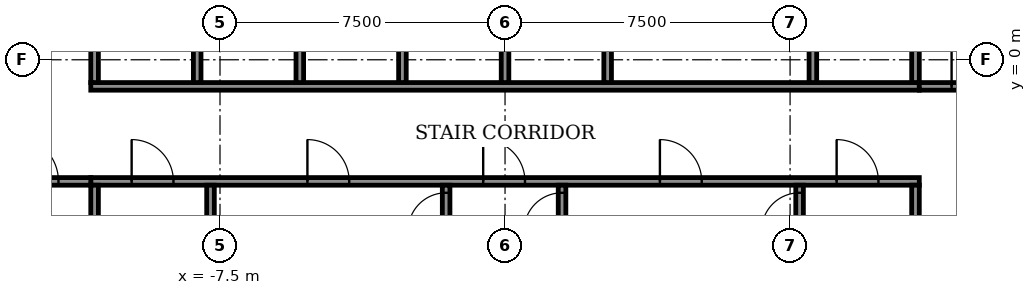
"""IFC4 building model, lengths in metres.
Left out: names, types, materials, properties, quantities, classifications, styles, units other than length and angle.
Written with IfcOpenShell. Run it as: python <this file> out.ifc"""

import sys

from ifc_helpers import new_model, si_unit, direction, frame, frame_2d, origin, place, context, subcontext, project, spatial, rectangle, extrude, element, fill, save


model = new_model("IFC4")
c1 = context("Model", 3, precision=1e-05, world=origin(), true_north=direction((0.0, 1.0)))
c2 = subcontext(c1, "Body", "Model", "MODEL_VIEW")
j1 = project(units=[si_unit("LENGTHUNIT", "METRE"), si_unit("PLANEANGLEUNIT", "RADIAN")], contexts=[c1])
p1 = place(None, origin())
s1 = spatial("IfcSite", under=j1, at=p1, CompositionType="ELEMENT")
p2 = place(p1, origin())
s2 = spatial("IfcBuilding", under=s1, at=p2, CompositionType="ELEMENT")
p3 = place(p2, frame((0.0, 0.0, 41.3)))
s3 = spatial("IfcBuildingStorey", under=s2, at=p3, CompositionType="ELEMENT", Elevation=41.3)
p4 = place(p3, frame((-10.9, -3.2, 0.0), z_axis=(0.0, 0.0, 1.0), x_axis=(1.0, 0.0, 0.0)))
e1 = element("IfcWall", 1, at=p4, inside=s3, PredefinedType="SHEAR", context=c2, shape_type="SweptSolid", body=[
    extrude(rectangle(XDim=21.8, YDim=0.2, at=frame_2d((10.9, 0.0))), origin(), (0.0, 0.0, 1.0), 3.05),
])
p5 = place(p4, frame((1.075, 0.0, 0.0)))
e2 = element("IfcOpeningElement", 2, at=p5, cuts=e1, PredefinedType="OPENING", context=c2, shape_type="SweptSolid", body=[
    extrude(rectangle(XDim=1.1, YDim=2.1, at=frame_2d((0.55, 1.05))), frame((0.0, 0.11, 0.0), z_axis=(0.0, -1.0, 0.0), x_axis=(1.0, 0.0, 0.0)), (0.0, 0.0, 1.0), 0.22),
])
p6 = place(p4, frame((10.325, 0.0, 0.0)))
e3 = element("IfcOpeningElement", 3, at=p6, cuts=e1, PredefinedType="OPENING", context=c2, shape_type="SweptSolid", body=[
    extrude(rectangle(XDim=1.1, YDim=2.1, at=frame_2d((0.55, 1.05))), frame((0.0, 0.11, 0.0), z_axis=(0.0, -1.0, 0.0), x_axis=(1.0, 0.0, 0.0)), (0.0, 0.0, 1.0), 0.22),
])
p7 = place(p4, frame((19.625, 0.0, 0.0)))
e4 = element("IfcOpeningElement", 4, at=p7, cuts=e1, PredefinedType="OPENING", context=c2, shape_type="SweptSolid", body=[
    extrude(rectangle(XDim=1.1, YDim=2.1, at=frame_2d((0.55, 1.05))), frame((0.0, 0.11, 0.0), z_axis=(0.0, -1.0, 0.0), x_axis=(1.0, 0.0, 0.0)), (0.0, 0.0, 1.0), 0.22),
])
p8 = place(p4, frame((5.7, 0.0, 0.0)))
e5 = element("IfcOpeningElement", 5, at=p8, cuts=e1, PredefinedType="OPENING", context=c2, shape_type="SweptSolid", body=[
    extrude(rectangle(XDim=1.1, YDim=2.1, at=frame_2d((0.55, 1.05))), frame((0.0, 0.11, 0.0), z_axis=(0.0, -1.0, 0.0), x_axis=(1.0, 0.0, 0.0)), (0.0, 0.0, 1.0), 0.22),
])
p9 = place(p4, frame((14.975, 0.0, 0.0)))
e6 = element("IfcOpeningElement", 6, at=p9, cuts=e1, PredefinedType="OPENING", context=c2, shape_type="SweptSolid", body=[
    extrude(rectangle(XDim=1.1, YDim=2.1, at=frame_2d((0.55, 1.05))), frame((0.0, 0.11, 0.0), z_axis=(0.0, -1.0, 0.0), x_axis=(1.0, 0.0, 0.0)), (0.0, 0.0, 1.0), 0.22),
])
p10 = place(p3, frame((-10.9, -0.7, 0.0), z_axis=(0.0, 0.0, 1.0), x_axis=(1.0, 0.0, 0.0)))
e7 = element("IfcWall", 7, at=p10, inside=s3, PredefinedType="SHEAR", context=c2, shape_type="SweptSolid", body=[
    extrude(rectangle(XDim=21.8, YDim=0.2, at=frame_2d((10.9, 0.0))), origin(), (0.0, 0.0, 1.0), 3.05),
])
for number, where, z_axis, x_axis in (
    (8, (-10.8, -10.8, 0.0), (0.0, 0.0, 1.0), (0.0, 1.0, 0.0)),
    (9, (-7.75, -10.8, 0.0), (0.0, 0.0, 1.0), (0.0, 1.0, 0.0)),
):
    element("IfcWall", number, at=place(p3, frame(where, z_axis=z_axis, x_axis=x_axis)), inside=s3, PredefinedType="SHEAR", context=c2, shape_type="SweptSolid", body=[
        extrude(rectangle(XDim=7.5, YDim=0.2, at=frame_2d((3.75, 0.0))), origin(), (0.0, 0.0, 1.0), 3.05),
    ])
p11 = place(p3, frame((-1.55, -10.8, 0.0), z_axis=(0.0, 0.0, 1.0), x_axis=(0.0, 1.0, 0.0)))
e10 = element("IfcWall", 10, at=p11, inside=s3, PredefinedType="SHEAR", context=c2, shape_type="SweptSolid", body=[
    extrude(rectangle(XDim=7.5, YDim=0.2, at=frame_2d((3.75, 0.0))), origin(), (0.0, 0.0, 1.0), 3.05),
])
p12 = place(p11, frame((6.3, 0.0, 0.0)))
e11 = element("IfcOpeningElement", 11, at=p12, cuts=e10, PredefinedType="OPENING", context=c2, shape_type="SweptSolid", body=[
    extrude(rectangle(XDim=1.0, YDim=2.1, at=frame_2d((0.5, 1.05))), frame((0.0, 0.11, 0.0), z_axis=(0.0, -1.0, 0.0), x_axis=(1.0, 0.0, 0.0)), (0.0, 0.0, 1.0), 0.22),
])
p13 = place(p3, frame((1.5, -10.8, 0.0), z_axis=(0.0, 0.0, 1.0), x_axis=(0.0, 1.0, 0.0)))
e12 = element("IfcWall", 12, at=p13, inside=s3, PredefinedType="SHEAR", context=c2, shape_type="SweptSolid", body=[
    extrude(rectangle(XDim=7.5, YDim=0.2, at=frame_2d((3.75, 0.0))), origin(), (0.0, 0.0, 1.0), 3.05),
])
p14 = place(p13, frame((6.3, 0.0, 0.0)))
e13 = element("IfcOpeningElement", 13, at=p14, cuts=e12, PredefinedType="OPENING", context=c2, shape_type="SweptSolid", body=[
    extrude(rectangle(XDim=1.0, YDim=2.1, at=frame_2d((0.5, 1.05))), frame((0.0, 0.11, 0.0), z_axis=(0.0, -1.0, 0.0), x_axis=(1.0, 0.0, 0.0)), (0.0, 0.0, 1.0), 0.22),
])
p15 = place(p3, frame((7.75, -10.8, 0.0), z_axis=(0.0, 0.0, 1.0), x_axis=(0.0, 1.0, 0.0)))
e14 = element("IfcWall", 14, at=p15, inside=s3, PredefinedType="SHEAR", context=c2, shape_type="SweptSolid", body=[
    extrude(rectangle(XDim=7.5, YDim=0.2, at=frame_2d((3.75, 0.0))), origin(), (0.0, 0.0, 1.0), 3.05),
])
p16 = place(p15, frame((6.3, 0.0, 0.0)))
e15 = element("IfcOpeningElement", 15, at=p16, cuts=e14, PredefinedType="OPENING", context=c2, shape_type="SweptSolid", body=[
    extrude(rectangle(XDim=1.0, YDim=2.1, at=frame_2d((0.5, 1.05))), frame((0.0, 0.11, 0.0), z_axis=(0.0, -1.0, 0.0), x_axis=(1.0, 0.0, 0.0)), (0.0, 0.0, 1.0), 0.22),
])
p17 = place(p3, frame((10.8, -10.8, 0.0), z_axis=(0.0, 0.0, 1.0), x_axis=(0.0, 1.0, 0.0)))
e16 = element("IfcWall", 16, at=p17, inside=s3, PredefinedType="SHEAR", context=c2, shape_type="SweptSolid", body=[
    extrude(rectangle(XDim=7.5, YDim=0.2, at=frame_2d((3.75, 0.0))), origin(), (0.0, 0.0, 1.0), 3.05),
])
for number, where, z_axis, x_axis in (
    (17, (-10.8, -0.6, 0.0), (0.0, 0.0, 1.0), (0.0, 1.0, 0.0)),
    (18, (-8.1, -0.6, 0.0), (0.0, 0.0, 1.0), (0.0, 1.0, 0.0)),
    (19, (-5.4, -0.6, 0.0), (0.0, 0.0, 1.0), (0.0, 1.0, 0.0)),
    (20, (-2.7, -0.6, 0.0), (0.0, 0.0, 1.0), (0.0, 1.0, 0.0)),
    (21, (0.0, -0.6, 0.0), (0.0, 0.0, 1.0), (0.0, 1.0, 0.0)),
    (22, (2.7, -0.6, 0.0), (0.0, 0.0, 1.0), (0.0, 1.0, 0.0)),
):
    element("IfcWall", number, at=place(p3, frame(where, z_axis=z_axis, x_axis=x_axis)), inside=s3, PredefinedType="SHEAR", context=c2, shape_type="SweptSolid", body=[
        extrude(rectangle(XDim=2.5, YDim=0.2, at=frame_2d((1.25, 0.0))), origin(), (0.0, 0.0, 1.0), 3.05),
    ])
for number, where, z_axis, x_axis in (
    (23, (8.1, -0.6, 0.0), (0.0, 0.0, 1.0), (0.0, 1.0, 0.0)),
    (24, (10.8, -0.6, 0.0), (0.0, 0.0, 1.0), (0.0, 1.0, 0.0)),
):
    element("IfcWall", number, at=place(p3, frame(where, z_axis=z_axis, x_axis=x_axis)), inside=s3, PredefinedType="STANDARD", context=c2, shape_type="SweptSolid", body=[
        extrude(rectangle(XDim=2.5, YDim=0.2, at=frame_2d((1.25, 0.0))), origin(), (0.0, 0.0, 1.0), 3.05),
    ])
p18 = place(p3, frame((-13.8, -3.2, 0.0), z_axis=(0.0, 0.0, 1.0), x_axis=(1.0, 0.0, 0.0)))
e25 = element("IfcWall", 25, at=p18, inside=s3, PredefinedType="STANDARD", context=c2, shape_type="SweptSolid", body=[
    extrude(rectangle(XDim=2.9, YDim=0.2, at=frame_2d((1.45, 0.0))), origin(), (0.0, 0.0, 1.0), 3.05),
])
p19 = place(p18, frame((0.85, 0.0, 0.0)))
e26 = element("IfcOpeningElement", 26, at=p19, cuts=e25, PredefinedType="OPENING", context=c2, shape_type="SweptSolid", body=[
    extrude(rectangle(XDim=1.2, YDim=2.1, at=frame_2d((0.6, 1.05))), frame((0.0, 0.11, 0.0), z_axis=(0.0, -1.0, 0.0), x_axis=(1.0, 0.0, 0.0)), (0.0, 0.0, 1.0), 0.22),
])
p20 = place(p3, frame((10.9, -0.7, 0.0), z_axis=(0.0, 0.0, 1.0), x_axis=(1.0, 0.0, 0.0)))
e27 = element("IfcWall", 27, at=p20, inside=s3, PredefinedType="STANDARD", context=c2, shape_type="SweptSolid", body=[
    extrude(rectangle(XDim=2.9, YDim=0.2, at=frame_2d((1.45, 0.0))), origin(), (0.0, 0.0, 1.0), 3.05),
])
p21 = place(p20, frame((0.85, 0.0, 0.0)))
e28 = element("IfcOpeningElement", 28, at=p21, cuts=e27, PredefinedType="OPENING", context=c2, shape_type="SweptSolid", body=[
    extrude(rectangle(XDim=1.2, YDim=2.1, at=frame_2d((0.6, 1.05))), frame((0.0, 0.11, 0.0), z_axis=(0.0, -1.0, 0.0), x_axis=(1.0, 0.0, 0.0)), (0.0, 0.0, 1.0), 0.22),
])
p22 = place(p5, origin())
e29 = element("IfcDoor", 29, at=p22, inside=s3, OperationType="SINGLE_SWING_RIGHT", PredefinedType="DOOR", context=c2, shape_type="SweptSolid", body=[
    extrude(rectangle(XDim=1.1, YDim=2.1, at=frame_2d((0.55, 1.05))), frame((0.0, 0.025, 0.0), z_axis=(0.0, -1.0, 0.0), x_axis=(1.0, 0.0, 0.0)), (0.0, 0.0, 1.0), 0.05),
])
fill(e2, e29)
p23 = place(p6, origin())
e30 = element("IfcDoor", 30, at=p23, inside=s3, OperationType="SINGLE_SWING_RIGHT", PredefinedType="DOOR", context=c2, shape_type="SweptSolid", body=[
    extrude(rectangle(XDim=1.1, YDim=2.1, at=frame_2d((0.55, 1.05))), frame((0.0, 0.025, 0.0), z_axis=(0.0, -1.0, 0.0), x_axis=(1.0, 0.0, 0.0)), (0.0, 0.0, 1.0), 0.05),
])
fill(e3, e30)
p24 = place(p7, origin())
e31 = element("IfcDoor", 31, at=p24, inside=s3, OperationType="SINGLE_SWING_RIGHT", PredefinedType="DOOR", context=c2, shape_type="SweptSolid", body=[
    extrude(rectangle(XDim=1.1, YDim=2.1, at=frame_2d((0.55, 1.05))), frame((0.0, 0.025, 0.0), z_axis=(0.0, -1.0, 0.0), x_axis=(1.0, 0.0, 0.0)), (0.0, 0.0, 1.0), 0.05),
])
fill(e4, e31)
p25 = place(p8, origin())
e32 = element("IfcDoor", 32, at=p25, inside=s3, OperationType="SINGLE_SWING_LEFT", PredefinedType="DOOR", context=c2, shape_type="SweptSolid", body=[
    extrude(rectangle(XDim=1.1, YDim=2.1, at=frame_2d((0.55, 1.05))), frame((0.0, 0.025, 0.0), z_axis=(0.0, -1.0, 0.0), x_axis=(1.0, 0.0, 0.0)), (0.0, 0.0, 1.0), 0.05),
])
fill(e5, e32)
p26 = place(p9, origin())
e33 = element("IfcDoor", 33, at=p26, inside=s3, OperationType="SINGLE_SWING_LEFT", PredefinedType="DOOR", context=c2, shape_type="SweptSolid", body=[
    extrude(rectangle(XDim=1.1, YDim=2.1, at=frame_2d((0.55, 1.05))), frame((0.0, 0.025, 0.0), z_axis=(0.0, -1.0, 0.0), x_axis=(1.0, 0.0, 0.0)), (0.0, 0.0, 1.0), 0.05),
])
fill(e6, e33)
p27 = place(p12, origin())
e34 = element("IfcDoor", 34, at=p27, inside=s3, OperationType="SINGLE_SWING_RIGHT", PredefinedType="DOOR", context=c2, shape_type="SweptSolid", body=[
    extrude(rectangle(XDim=1.0, YDim=2.1, at=frame_2d((0.5, 1.05))), frame((0.0, 0.025, 0.0), z_axis=(0.0, -1.0, 0.0), x_axis=(1.0, 0.0, 0.0)), (0.0, 0.0, 1.0), 0.05),
])
fill(e11, e34)
p28 = place(p14, origin())
e35 = element("IfcDoor", 35, at=p28, inside=s3, OperationType="SINGLE_SWING_RIGHT", PredefinedType="DOOR", context=c2, shape_type="SweptSolid", body=[
    extrude(rectangle(XDim=1.0, YDim=2.1, at=frame_2d((0.5, 1.05))), frame((0.0, 0.025, 0.0), z_axis=(0.0, -1.0, 0.0), x_axis=(1.0, 0.0, 0.0)), (0.0, 0.0, 1.0), 0.05),
])
fill(e13, e35)
p29 = place(p16, origin())
e36 = element("IfcDoor", 36, at=p29, inside=s3, OperationType="SINGLE_SWING_RIGHT", PredefinedType="DOOR", context=c2, shape_type="SweptSolid", body=[
    extrude(rectangle(XDim=1.0, YDim=2.1, at=frame_2d((0.5, 1.05))), frame((0.0, 0.025, 0.0), z_axis=(0.0, -1.0, 0.0), x_axis=(1.0, 0.0, 0.0)), (0.0, 0.0, 1.0), 0.05),
])
fill(e15, e36)
p30 = place(p19, origin())
e37 = element("IfcDoor", 37, at=p30, inside=s3, OperationType="SINGLE_SWING_LEFT", PredefinedType="DOOR", context=c2, shape_type="SweptSolid", body=[
    extrude(rectangle(XDim=1.2, YDim=2.1, at=frame_2d((0.6, 1.05))), frame((0.0, 0.025, 0.0), z_axis=(0.0, -1.0, 0.0), x_axis=(1.0, 0.0, 0.0)), (0.0, 0.0, 1.0), 0.05),
])
fill(e26, e37)
p31 = place(p21, origin())
e38 = element("IfcDoor", 38, at=p31, inside=s3, OperationType="SINGLE_SWING_LEFT", PredefinedType="DOOR", context=c2, shape_type="SweptSolid", body=[
    extrude(rectangle(XDim=1.2, YDim=2.1, at=frame_2d((0.6, 1.05))), frame((0.0, 0.025, 0.0), z_axis=(0.0, -1.0, 0.0), x_axis=(1.0, 0.0, 0.0)), (0.0, 0.0, 1.0), 0.05),
])
fill(e28, e38)
save(model, sys.argv[1])
